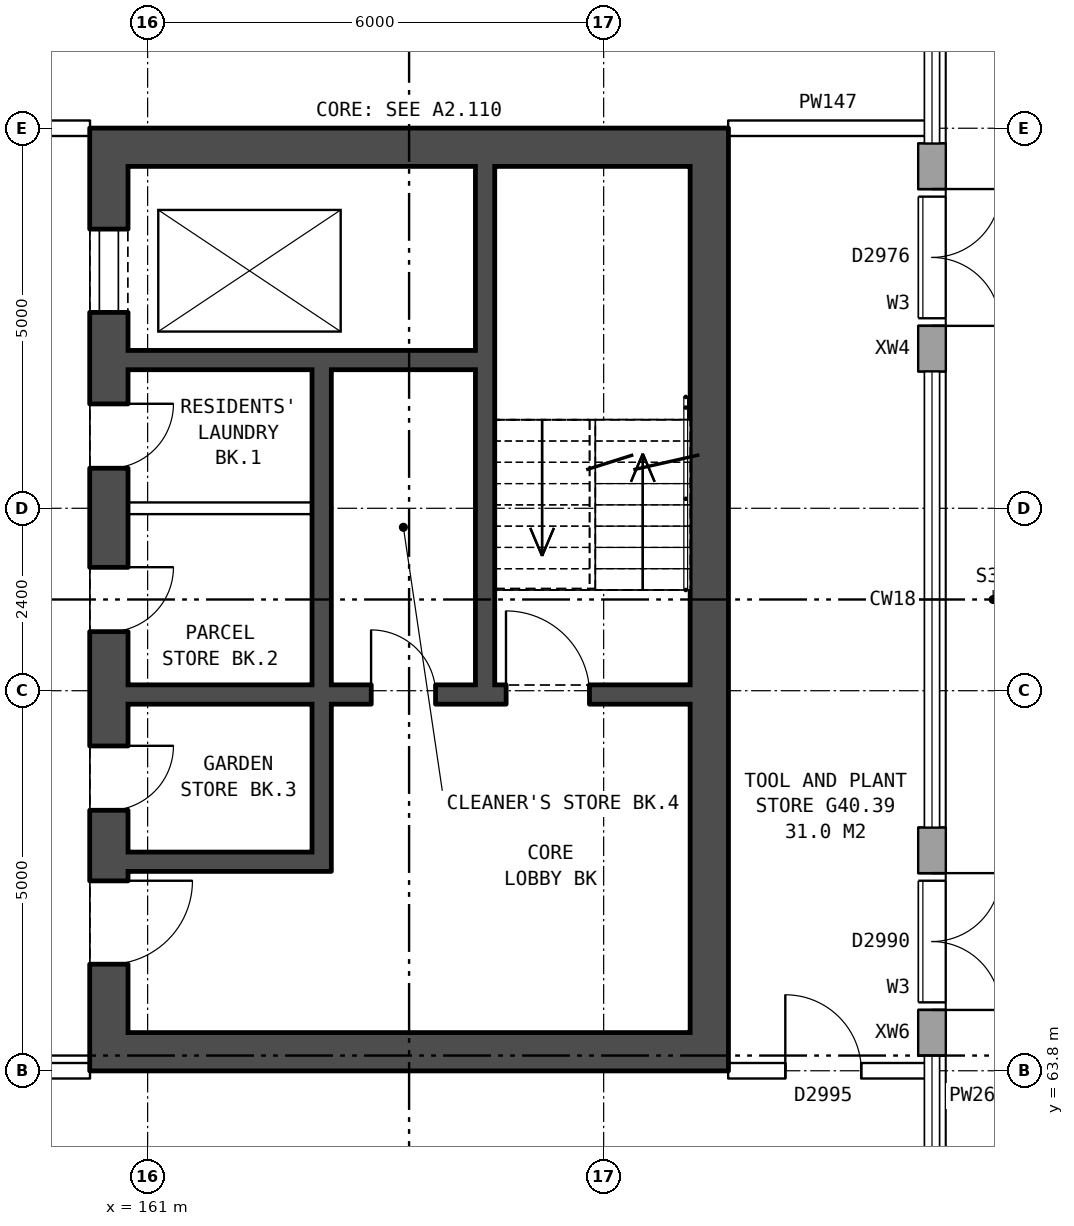
"""IFC4 building model, lengths in metres.
Left out: names, types, materials, properties, quantities, classifications, styles, units other than length and angle.
Written with IfcOpenShell. Run it as: python <this file> out.ifc"""

import sys

from ifc_helpers import new_model, si_unit, direction, frame, frame_2d, origin, place, context, subcontext, project, spatial, rectangle, extrude, element, fill, save


model = new_model("IFC4")
c1 = context("Model", 3, precision=1e-05, world=origin(), true_north=direction((0.0, 1.0)))
c2 = subcontext(c1, "Body", "Model", "MODEL_VIEW")
j1 = project(units=[si_unit("LENGTHUNIT", "METRE"), si_unit("PLANEANGLEUNIT", "RADIAN")], contexts=[c1])
p1 = place(None, origin())
s1 = spatial("IfcSite", under=j1, at=p1, CompositionType="ELEMENT")
p2 = place(p1, origin())
s2 = spatial("IfcBuilding", under=s1, at=p2, CompositionType="ELEMENT")
p3 = place(p2, frame((0.0, 0.0, 142.3)))
s3 = spatial("IfcBuildingStorey", under=s2, at=p3, CompositionType="ELEMENT", Elevation=142.3)
p4 = place(p3, frame((171.32, 64.0, 0.0), z_axis=(0.0, 0.0, 1.0), x_axis=(0.0, 1.0, 0.0)))
e1 = element("IfcWall", 1, at=p4, inside=s3, PredefinedType="STANDARD", context=c2, shape_type="SweptSolid", body=[
    extrude(rectangle(XDim=3.0, YDim=0.36, at=frame_2d((1.5, 0.0))), origin(), (0.0, 0.0, 1.0), 5.6),
])
p5 = place(p4, frame((0.7, 0.0, 3.4)))
e2 = element("IfcOpeningElement", 2, at=p5, cuts=e1, PredefinedType="OPENING", context=c2, shape_type="SweptSolid", body=[
    extrude(rectangle(XDim=1.6, YDim=1.2, at=frame_2d((0.8, 0.6))), frame((0.0, 0.19, 0.0), z_axis=(0.0, -1.0, 0.0), x_axis=(1.0, 0.0, 0.0)), (0.0, 0.0, 1.0), 0.38),
])
p6 = place(p4, frame((0.6, 0.0, 0.0)))
e3 = element("IfcOpeningElement", 3, at=p6, cuts=e1, PredefinedType="OPENING", context=c2, shape_type="SweptSolid", body=[
    extrude(rectangle(XDim=1.8, YDim=2.4, at=frame_2d((0.9, 1.2))), frame((0.0, 0.19, 0.0), z_axis=(0.0, -1.0, 0.0), x_axis=(1.0, 0.0, 0.0)), (0.0, 0.0, 1.0), 0.38),
])
p7 = place(p3, frame((171.32, 73.0, 0.0), z_axis=(0.0, 0.0, 1.0), x_axis=(0.0, 1.0, 0.0)))
e4 = element("IfcWall", 4, at=p7, inside=s3, PredefinedType="STANDARD", context=c2, shape_type="SweptSolid", body=[
    extrude(rectangle(XDim=3.0, YDim=0.36, at=frame_2d((1.5, 0.0))), origin(), (0.0, 0.0, 1.0), 5.6),
])
p8 = place(p7, frame((0.7, 0.0, 3.4)))
e5 = element("IfcOpeningElement", 5, at=p8, cuts=e4, PredefinedType="OPENING", context=c2, shape_type="SweptSolid", body=[
    extrude(rectangle(XDim=1.6, YDim=1.2, at=frame_2d((0.8, 0.6))), frame((0.0, 0.19, 0.0), z_axis=(0.0, -1.0, 0.0), x_axis=(1.0, 0.0, 0.0)), (0.0, 0.0, 1.0), 0.38),
])
p9 = place(p7, frame((0.6, 0.0, 0.0)))
e6 = element("IfcOpeningElement", 6, at=p9, cuts=e4, PredefinedType="OPENING", context=c2, shape_type="SweptSolid", body=[
    extrude(rectangle(XDim=1.8, YDim=2.4, at=frame_2d((0.9, 1.2))), frame((0.0, 0.19, 0.0), z_axis=(0.0, -1.0, 0.0), x_axis=(1.0, 0.0, 0.0)), (0.0, 0.0, 1.0), 0.38),
])
p10 = place(p3, frame((160.49, 76.2, 0.0), z_axis=(0.0, 0.0, 1.0), x_axis=(0.0, -1.0, 0.0)))
e7 = element("IfcWall", 7, at=p10, inside=s3, PredefinedType="SHEAR", context=c2, shape_type="SweptSolid", body=[
    extrude(rectangle(XDim=12.4, YDim=0.5, at=frame_2d((6.2, 0.0))), origin(), (0.0, 0.0, 1.0), 5.6),
])
p11 = place(p10, frame((1.325, 0.0, 0.0)))
e8 = element("IfcOpeningElement", 8, at=p11, cuts=e7, PredefinedType="OPENING", context=c2, shape_type="SweptSolid", body=[
    extrude(rectangle(XDim=1.1, YDim=2.1, at=frame_2d((0.55, 1.05))), frame((0.0, 0.26, 0.0), z_axis=(0.0, -1.0, 0.0), x_axis=(1.0, 0.0, 0.0)), (0.0, 0.0, 1.0), 0.52),
])
p12 = place(p10, frame((3.625, 0.0, 0.0)))
e9 = element("IfcOpeningElement", 9, at=p12, cuts=e7, PredefinedType="OPENING", context=c2, shape_type="SweptSolid", body=[
    extrude(rectangle(XDim=0.85, YDim=2.1, at=frame_2d((0.425, 1.05))), frame((0.0, 0.26, 0.0), z_axis=(0.0, -1.0, 0.0), x_axis=(1.0, 0.0, 0.0)), (0.0, 0.0, 1.0), 0.52),
])
p13 = place(p10, frame((5.775, 0.0, 0.0)))
e10 = element("IfcOpeningElement", 10, at=p13, cuts=e7, PredefinedType="OPENING", context=c2, shape_type="SweptSolid", body=[
    extrude(rectangle(XDim=0.85, YDim=2.1, at=frame_2d((0.425, 1.05))), frame((0.0, 0.26, 0.0), z_axis=(0.0, -1.0, 0.0), x_axis=(1.0, 0.0, 0.0)), (0.0, 0.0, 1.0), 0.52),
])
p14 = place(p10, frame((9.9, 0.0, 0.0)))
e11 = element("IfcOpeningElement", 11, at=p14, cuts=e7, PredefinedType="OPENING", context=c2, shape_type="SweptSolid", body=[
    extrude(rectangle(XDim=1.1, YDim=2.1, at=frame_2d((0.55, 1.05))), frame((0.0, 0.26, 0.0), z_axis=(0.0, -1.0, 0.0), x_axis=(1.0, 0.0, 0.0)), (0.0, 0.0, 1.0), 0.52),
])
p15 = place(p10, frame((8.125, 0.0, 0.0)))
e12 = element("IfcOpeningElement", 12, at=p15, cuts=e7, PredefinedType="OPENING", context=c2, shape_type="SweptSolid", body=[
    extrude(rectangle(XDim=0.85, YDim=2.1, at=frame_2d((0.425, 1.05))), frame((0.0, 0.26, 0.0), z_axis=(0.0, -1.0, 0.0), x_axis=(1.0, 0.0, 0.0)), (0.0, 0.0, 1.0), 0.52),
])
p16 = place(p3, frame((168.39, 76.2, 0.0), z_axis=(0.0, 0.0, 1.0), x_axis=(0.0, -1.0, 0.0)))
e13 = element("IfcWall", 13, at=p16, inside=s3, PredefinedType="SHEAR", context=c2, shape_type="SweptSolid", body=[
    extrude(rectangle(XDim=12.4, YDim=0.5, at=frame_2d((6.2, 0.0))), origin(), (0.0, 0.0, 1.0), 5.6),
])
for number, where, z_axis, x_axis in (
    (14, (160.74, 75.95, 0.0), (0.0, 0.0, 1.0), (1.0, 0.0, 0.0)),
    (15, (160.74, 64.05, 0.0), (0.0, 0.0, 1.0), (1.0, 0.0, 0.0)),
):
    element("IfcWall", number, at=place(p3, frame(where, z_axis=z_axis, x_axis=x_axis)), inside=s3, PredefinedType="SHEAR", context=c2, shape_type="SweptSolid", body=[
        extrude(rectangle(XDim=7.4, YDim=0.5, at=frame_2d((3.7, 0.0))), origin(), (0.0, 0.0, 1.0), 5.6),
    ])
p17 = place(p3, frame((160.74, 73.15, 0.0), z_axis=(0.0, 0.0, 1.0), x_axis=(1.0, 0.0, 0.0)))
e16 = element("IfcWall", 16, at=p17, inside=s3, PredefinedType="SHEAR", context=c2, shape_type="SweptSolid", body=[
    extrude(rectangle(XDim=4.575, YDim=0.25, at=frame_2d((2.288, 0.0))), origin(), (0.0, 0.0, 1.0), 5.6),
])
p18 = place(p3, frame((160.74, 71.2, 0.0), z_axis=(0.0, 0.0, 1.0), x_axis=(1.0, 0.0, 0.0)))
e17 = element("IfcWall", 17, at=p18, inside=s3, PredefinedType="PARTITIONING", context=c2, shape_type="SweptSolid", body=[
    extrude(rectangle(XDim=2.425, YDim=0.15, at=frame_2d((1.212, 0.0))), origin(), (0.0, 0.0, 1.0), 5.6),
])
p19 = place(p3, frame((160.74, 68.75, 0.0), z_axis=(0.0, 0.0, 1.0), x_axis=(1.0, 0.0, 0.0)))
e18 = element("IfcWall", 18, at=p19, inside=s3, PredefinedType="SHEAR", context=c2, shape_type="SweptSolid", body=[
    extrude(rectangle(XDim=7.4, YDim=0.25, at=frame_2d((3.7, 0.0))), origin(), (0.0, 0.0, 1.0), 5.6),
])
p20 = place(p19, frame((4.975, 0.0, 0.0)))
e19 = element("IfcOpeningElement", 19, at=p20, cuts=e18, PredefinedType="OPENING", context=c2, shape_type="SweptSolid", body=[
    extrude(rectangle(XDim=1.1, YDim=2.1, at=frame_2d((0.55, 1.05))), frame((0.0, 0.135, 0.0), z_axis=(0.0, -1.0, 0.0), x_axis=(1.0, 0.0, 0.0)), (0.0, 0.0, 1.0), 0.27),
])
p21 = place(p19, frame((3.2, 0.0, 0.0)))
e20 = element("IfcOpeningElement", 20, at=p21, cuts=e18, PredefinedType="OPENING", context=c2, shape_type="SweptSolid", body=[
    extrude(rectangle(XDim=0.85, YDim=2.1, at=frame_2d((0.425, 1.05))), frame((0.0, 0.135, 0.0), z_axis=(0.0, -1.0, 0.0), x_axis=(1.0, 0.0, 0.0)), (0.0, 0.0, 1.0), 0.27),
])
p22 = place(p3, frame((160.74, 66.55, 0.0), z_axis=(0.0, 0.0, 1.0), x_axis=(1.0, 0.0, 0.0)))
e21 = element("IfcWall", 21, at=p22, inside=s3, PredefinedType="SHEAR", context=c2, shape_type="SweptSolid", body=[
    extrude(rectangle(XDim=2.425, YDim=0.25, at=frame_2d((1.212, 0.0))), origin(), (0.0, 0.0, 1.0), 5.6),
])
p23 = place(p3, frame((163.29, 73.025, 0.0), z_axis=(0.0, 0.0, 1.0), x_axis=(0.0, -1.0, 0.0)))
e22 = element("IfcWall", 22, at=p23, inside=s3, PredefinedType="SHEAR", context=c2, shape_type="SweptSolid", body=[
    extrude(rectangle(XDim=4.15, YDim=0.25, at=frame_2d((2.075, 0.0))), origin(), (0.0, 0.0, 1.0), 5.6),
])
p24 = place(p3, frame((163.29, 68.625, 0.0), z_axis=(0.0, 0.0, 1.0), x_axis=(0.0, -1.0, 0.0)))
e23 = element("IfcWall", 23, at=p24, inside=s3, PredefinedType="SHEAR", context=c2, shape_type="SweptSolid", body=[
    extrude(rectangle(XDim=2.2, YDim=0.25, at=frame_2d((1.1, 0.0))), origin(), (0.0, 0.0, 1.0), 5.6),
])
p25 = place(p3, frame((165.44, 75.7, 0.0), z_axis=(0.0, 0.0, 1.0), x_axis=(0.0, -1.0, 0.0)))
e24 = element("IfcWall", 24, at=p25, inside=s3, PredefinedType="SHEAR", context=c2, shape_type="SweptSolid", body=[
    extrude(rectangle(XDim=6.825, YDim=0.25, at=frame_2d((3.413, 0.0))), origin(), (0.0, 0.0, 1.0), 5.6),
])
p26 = place(p3, frame((168.64, 63.8, 0.0), z_axis=(0.0, 0.0, 1.0), x_axis=(1.0, 0.0, 0.0)))
e25 = element("IfcWall", 25, at=p26, inside=s3, PredefinedType="PARTITIONING", context=c2, shape_type="SweptSolid", body=[
    extrude(rectangle(XDim=2.62, YDim=0.2, at=frame_2d((1.31, 0.0))), origin(), (0.0, 0.0, 1.0), 5.6),
])
p27 = place(p26, frame((0.75, 0.0, 0.0)))
e26 = element("IfcOpeningElement", 26, at=p27, cuts=e25, PredefinedType="OPENING", context=c2, shape_type="SweptSolid", body=[
    extrude(rectangle(XDim=1.0, YDim=2.1, at=frame_2d((0.5, 1.05))), frame((0.0, 0.11, 0.0), z_axis=(0.0, -1.0, 0.0), x_axis=(1.0, 0.0, 0.0)), (0.0, 0.0, 1.0), 0.22),
])
p28 = place(p3, frame((157.14, 63.8, 0.0), z_axis=(0.0, 0.0, 1.0), x_axis=(1.0, 0.0, 0.0)))
e27 = element("IfcWall", 27, at=p28, inside=s3, PredefinedType="PARTITIONING", context=c2, shape_type="SweptSolid", body=[
    extrude(rectangle(XDim=3.1, YDim=0.2, at=frame_2d((1.55, 0.0))), origin(), (0.0, 0.0, 1.0), 5.6),
])
p29 = place(p28, frame((1.1, 0.0, 0.0)))
e28 = element("IfcOpeningElement", 28, at=p29, cuts=e27, PredefinedType="OPENING", context=c2, shape_type="SweptSolid", body=[
    extrude(rectangle(XDim=1.0, YDim=2.1, at=frame_2d((0.5, 1.05))), frame((0.0, 0.11, 0.0), z_axis=(0.0, -1.0, 0.0), x_axis=(1.0, 0.0, 0.0)), (0.0, 0.0, 1.0), 0.22),
])
p30 = place(p3, frame((168.64, 76.2, 0.0), z_axis=(0.0, 0.0, 1.0), x_axis=(1.0, 0.0, 0.0)))
e29 = element("IfcWall", 29, at=p30, inside=s3, PredefinedType="PARTITIONING", context=c2, shape_type="SweptSolid", body=[
    extrude(rectangle(XDim=2.62, YDim=0.2, at=frame_2d((1.31, 0.0))), origin(), (0.0, 0.0, 1.0), 5.6),
])
p31 = place(p3, frame((157.14, 76.2, 0.0), z_axis=(0.0, 0.0, 1.0), x_axis=(1.0, 0.0, 0.0)))
e30 = element("IfcWall", 30, at=p31, inside=s3, PredefinedType="PARTITIONING", context=c2, shape_type="SweptSolid", body=[
    extrude(rectangle(XDim=3.1, YDim=0.2, at=frame_2d((1.55, 0.0))), origin(), (0.0, 0.0, 1.0), 5.6),
])
p32 = place(p31, frame((1.1, 0.0, 0.0)))
e31 = element("IfcOpeningElement", 31, at=p32, cuts=e30, PredefinedType="OPENING", context=c2, shape_type="SweptSolid", body=[
    extrude(rectangle(XDim=1.0, YDim=2.1, at=frame_2d((0.5, 1.05))), frame((0.0, 0.11, 0.0), z_axis=(0.0, -1.0, 0.0), x_axis=(1.0, 0.0, 0.0)), (0.0, 0.0, 1.0), 0.22),
])
p33 = place(p5, origin())
e32 = element("IfcWindow", 32, at=p33, inside=s3, PartitioningType="DOUBLE_PANEL_HORIZONTAL", PredefinedType="WINDOW", context=c2, shape_type="SweptSolid", body=[
    extrude(rectangle(XDim=1.6, YDim=1.2, at=frame_2d((0.8, 0.6))), frame((0.0, 0.15, 0.0), z_axis=(0.0, -1.0, 0.0), x_axis=(1.0, 0.0, 0.0)), (0.0, 0.0, 1.0), 0.06),
])
fill(e2, e32)
p34 = place(p6, frame((1.8, 0.0, 0.0), z_axis=(0.0, 0.0, 1.0), x_axis=(-1.0, 0.0, 0.0)))
e33 = element("IfcDoor", 33, at=p34, inside=s3, OperationType="DOUBLE_DOOR_SINGLE_SWING", PredefinedType="DOOR", context=c2, shape_type="SweptSolid", body=[
    extrude(rectangle(XDim=1.8, YDim=2.4, at=frame_2d((0.9, 1.2))), frame((0.0, 0.025, 0.0), z_axis=(0.0, -1.0, 0.0), x_axis=(1.0, 0.0, 0.0)), (0.0, 0.0, 1.0), 0.05),
])
fill(e3, e33)
p35 = place(p8, origin())
e34 = element("IfcWindow", 34, at=p35, inside=s3, PartitioningType="DOUBLE_PANEL_HORIZONTAL", PredefinedType="WINDOW", context=c2, shape_type="SweptSolid", body=[
    extrude(rectangle(XDim=1.6, YDim=1.2, at=frame_2d((0.8, 0.6))), frame((0.0, 0.15, 0.0), z_axis=(0.0, -1.0, 0.0), x_axis=(1.0, 0.0, 0.0)), (0.0, 0.0, 1.0), 0.06),
])
fill(e5, e34)
p36 = place(p9, frame((1.8, 0.0, 0.0), z_axis=(0.0, 0.0, 1.0), x_axis=(-1.0, 0.0, 0.0)))
e35 = element("IfcDoor", 35, at=p36, inside=s3, OperationType="DOUBLE_DOOR_SINGLE_SWING", PredefinedType="DOOR", context=c2, shape_type="SweptSolid", body=[
    extrude(rectangle(XDim=1.8, YDim=2.4, at=frame_2d((0.9, 1.2))), frame((0.0, 0.025, 0.0), z_axis=(0.0, -1.0, 0.0), x_axis=(1.0, 0.0, 0.0)), (0.0, 0.0, 1.0), 0.05),
])
fill(e6, e35)
p37 = place(p11, origin())
e36 = element("IfcDoor", 36, at=p37, inside=s3, OperationType="DOUBLE_DOOR_SLIDING", PredefinedType="DOOR", context=c2, shape_type="SweptSolid", body=[
    extrude(rectangle(XDim=1.1, YDim=2.1, at=frame_2d((0.55, 1.05))), frame((0.0, 0.235, 0.0), z_axis=(0.0, -1.0, 0.0), x_axis=(1.0, 0.0, 0.0)), (0.0, 0.0, 1.0), 0.05),
])
fill(e8, e36)
p38 = place(p12, origin())
e37 = element("IfcDoor", 37, at=p38, inside=s3, OperationType="SINGLE_SWING_LEFT", PredefinedType="DOOR", context=c2, shape_type="SweptSolid", body=[
    extrude(rectangle(XDim=0.85, YDim=2.1, at=frame_2d((0.425, 1.05))), frame((0.0, 0.235, 0.0), z_axis=(0.0, -1.0, 0.0), x_axis=(1.0, 0.0, 0.0)), (0.0, 0.0, 1.0), 0.05),
])
fill(e9, e37)
p39 = place(p13, origin())
e38 = element("IfcDoor", 38, at=p39, inside=s3, OperationType="SINGLE_SWING_LEFT", PredefinedType="DOOR", context=c2, shape_type="SweptSolid", body=[
    extrude(rectangle(XDim=0.85, YDim=2.1, at=frame_2d((0.425, 1.05))), frame((0.0, 0.235, 0.0), z_axis=(0.0, -1.0, 0.0), x_axis=(1.0, 0.0, 0.0)), (0.0, 0.0, 1.0), 0.05),
])
fill(e10, e38)
p40 = place(p14, origin())
e39 = element("IfcDoor", 39, at=p40, inside=s3, OperationType="SINGLE_SWING_LEFT", PredefinedType="DOOR", context=c2, shape_type="SweptSolid", body=[
    extrude(rectangle(XDim=1.1, YDim=2.1, at=frame_2d((0.55, 1.05))), frame((0.0, 0.235, 0.0), z_axis=(0.0, -1.0, 0.0), x_axis=(1.0, 0.0, 0.0)), (0.0, 0.0, 1.0), 0.05),
])
fill(e11, e39)
p41 = place(p20, origin())
e40 = element("IfcDoor", 40, at=p41, inside=s3, OperationType="SINGLE_SWING_LEFT", PredefinedType="DOOR", context=c2, shape_type="SweptSolid", body=[
    extrude(rectangle(XDim=1.1, YDim=2.1, at=frame_2d((0.55, 1.05))), frame((0.0, 0.025, 0.0), z_axis=(0.0, -1.0, 0.0), x_axis=(1.0, 0.0, 0.0)), (0.0, 0.0, 1.0), 0.05),
])
fill(e19, e40)
p42 = place(p15, origin())
e41 = element("IfcDoor", 41, at=p42, inside=s3, OperationType="SINGLE_SWING_LEFT", PredefinedType="DOOR", context=c2, shape_type="SweptSolid", body=[
    extrude(rectangle(XDim=0.85, YDim=2.1, at=frame_2d((0.425, 1.05))), frame((0.0, 0.235, 0.0), z_axis=(0.0, -1.0, 0.0), x_axis=(1.0, 0.0, 0.0)), (0.0, 0.0, 1.0), 0.05),
])
fill(e12, e41)
p43 = place(p21, origin())
e42 = element("IfcDoor", 42, at=p43, inside=s3, OperationType="SINGLE_SWING_LEFT", PredefinedType="DOOR", context=c2, shape_type="SweptSolid", body=[
    extrude(rectangle(XDim=0.85, YDim=2.1, at=frame_2d((0.425, 1.05))), frame((0.0, 0.025, 0.0), z_axis=(0.0, -1.0, 0.0), x_axis=(1.0, 0.0, 0.0)), (0.0, 0.0, 1.0), 0.05),
])
fill(e20, e42)
p44 = place(p27, origin())
e43 = element("IfcDoor", 43, at=p44, inside=s3, OperationType="SINGLE_SWING_LEFT", PredefinedType="DOOR", context=c2, shape_type="SweptSolid", body=[
    extrude(rectangle(XDim=1.0, YDim=2.1, at=frame_2d((0.5, 1.05))), frame((0.0, 0.025, 0.0), z_axis=(0.0, -1.0, 0.0), x_axis=(1.0, 0.0, 0.0)), (0.0, 0.0, 1.0), 0.05),
])
fill(e26, e43)
save(model, sys.argv[1])
